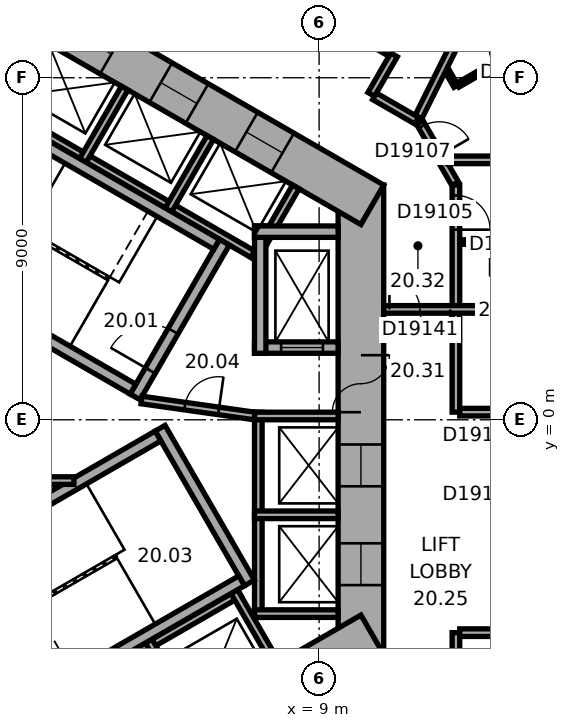
"""IFC4 building model, lengths in metres.
Left out: names, types, materials, properties, quantities, classifications, styles, units other than length and angle.
Written with IfcOpenShell. Run it as: python <this file> out.ifc"""

import sys

from ifc_helpers import new_model, si_unit, direction, frame, frame_2d, origin, place, context, subcontext, project, spatial, rectangle, extrude, element, fill, save


model = new_model("IFC4")
c1 = context("Model", 3, precision=1e-05, world=origin(), true_north=direction((0.0, 1.0)))
c2 = subcontext(c1, "Body", "Model", "MODEL_VIEW")
j1 = project(units=[si_unit("LENGTHUNIT", "METRE"), si_unit("PLANEANGLEUNIT", "RADIAN")], contexts=[c1])
p1 = place(None, origin())
s1 = spatial("IfcSite", under=j1, at=p1, CompositionType="ELEMENT")
p2 = place(p1, origin())
s2 = spatial("IfcBuilding", under=s1, at=p2, CompositionType="ELEMENT")
p3 = place(p2, frame((0.0, 0.0, 90.2)))
s3 = spatial("IfcBuildingStorey", under=s2, at=p3, CompositionType="ELEMENT", Elevation=90.2)
p4 = place(p3, frame((10.1, -6.177, 0.0), z_axis=(0.0, 0.0, 1.0), x_axis=(0.0, 1.0, 0.0)))
e1 = element("IfcWall", 1, at=p4, inside=s3, PredefinedType="SHEAR", context=c2, shape_type="SweptSolid", body=[
    extrude(rectangle(XDim=12.355, YDim=1.2, at=frame_2d((6.177, 0.0))), origin(), (0.0, 0.0, 1.0), 3.3),
])
p5 = place(p4, frame((6.378, 0.0, 0.0)))
e2 = element("IfcOpeningElement", 2, at=p5, cuts=e1, PredefinedType="OPENING", context=c2, shape_type="SweptSolid", body=[
    extrude(rectangle(XDim=1.5, YDim=2.1, at=frame_2d((0.75, 1.05))), frame((0.0, 0.61, 0.0), z_axis=(0.0, -1.0, 0.0), x_axis=(1.0, 0.0, 0.0)), (0.0, 0.0, 1.0), 1.22),
])
p6 = place(p4, frame((1.828, 0.0, 0.0)))
e3 = element("IfcOpeningElement", 3, at=p6, cuts=e1, PredefinedType="OPENING", context=c2, shape_type="SweptSolid", body=[
    extrude(rectangle(XDim=1.1, YDim=2.1, at=frame_2d((0.55, 1.05))), frame((0.0, 0.61, 0.0), z_axis=(0.0, -1.0, 0.0), x_axis=(1.0, 0.0, 0.0)), (0.0, 0.0, 1.0), 1.22),
])
p7 = place(p4, frame((4.427, 0.0, 0.0)))
e4 = element("IfcOpeningElement", 4, at=p7, cuts=e1, PredefinedType="OPENING", context=c2, shape_type="SweptSolid", body=[
    extrude(rectangle(XDim=1.1, YDim=2.1, at=frame_2d((0.55, 1.05))), frame((0.0, 0.61, 0.0), z_axis=(0.0, -1.0, 0.0), x_axis=(1.0, 0.0, 0.0)), (0.0, 0.0, 1.0), 1.22),
])
p8 = place(p3, frame((10.4, 5.658, 0.0), z_axis=(0.0, 0.0, 1.0), x_axis=(-0.866021384402, 0.500006961711, 0.0)))
e5 = element("IfcWall", 5, at=p8, inside=s3, PredefinedType="SHEAR", context=c2, shape_type="SweptSolid", body=[
    extrude(rectangle(XDim=12.355, YDim=1.2, at=frame_2d((6.178, 0.0))), origin(), (0.0, 0.0, 1.0), 3.3),
])
p9 = place(p8, frame((2.728, 0.0, 0.0)))
e6 = element("IfcOpeningElement", 6, at=p9, cuts=e5, PredefinedType="OPENING", context=c2, shape_type="SweptSolid", body=[
    extrude(rectangle(XDim=1.1, YDim=2.1, at=frame_2d((0.55, 1.05))), frame((0.0, 0.61, 0.0), z_axis=(0.0, -1.0, 0.0), x_axis=(1.0, 0.0, 0.0)), (0.0, 0.0, 1.0), 1.22),
])
p10 = place(p8, frame((5.328, 0.0, 0.0)))
e7 = element("IfcOpeningElement", 7, at=p10, cuts=e5, PredefinedType="OPENING", context=c2, shape_type="SweptSolid", body=[
    extrude(rectangle(XDim=1.1, YDim=2.1, at=frame_2d((0.55, 1.05))), frame((0.0, 0.61, 0.0), z_axis=(0.0, -1.0, 0.0), x_axis=(1.0, 0.0, 0.0)), (0.0, 0.0, 1.0), 1.22),
])
p11 = place(p8, frame((7.928, 0.0, 0.0)))
e8 = element("IfcOpeningElement", 8, at=p11, cuts=e5, PredefinedType="OPENING", context=c2, shape_type="SweptSolid", body=[
    extrude(rectangle(XDim=1.1, YDim=2.1, at=frame_2d((0.55, 1.05))), frame((0.0, 0.61, 0.0), z_axis=(0.0, -1.0, 0.0), x_axis=(1.0, 0.0, 0.0)), (0.0, 0.0, 1.0), 1.22),
])
p12 = place(p3, frame((-0.3, -11.836, 0.0), z_axis=(0.0, 0.0, 1.0), x_axis=(0.866021384402, 0.500006961711, 0.0)))
e9 = element("IfcWall", 9, at=p12, inside=s3, PredefinedType="SHEAR", context=c2, shape_type="SweptSolid", body=[
    extrude(rectangle(XDim=12.355, YDim=1.2, at=frame_2d((6.178, 0.0))), origin(), (0.0, 0.0, 1.0), 3.3),
])
p13 = place(p12, frame((4.128, 0.0, 0.0)))
e10 = element("IfcOpeningElement", 10, at=p13, cuts=e9, PredefinedType="OPENING", context=c2, shape_type="SweptSolid", body=[
    extrude(rectangle(XDim=0.9, YDim=2.1, at=frame_2d((0.45, 1.05))), frame((0.0, 0.61, 0.0), z_axis=(0.0, -1.0, 0.0), x_axis=(1.0, 0.0, 0.0)), (0.0, 0.0, 1.0), 1.22),
])
p14 = place(p12, frame((7.928, 0.0, 0.0)))
e11 = element("IfcOpeningElement", 11, at=p14, cuts=e9, PredefinedType="OPENING", context=c2, shape_type="SweptSolid", body=[
    extrude(rectangle(XDim=1.1, YDim=2.1, at=frame_2d((0.55, 1.05))), frame((0.0, 0.61, 0.0), z_axis=(0.0, -1.0, 0.0), x_axis=(1.0, 0.0, 0.0)), (0.0, 0.0, 1.0), 1.22),
])
p15 = place(p3, frame((7.4, -5.2, 0.0), z_axis=(0.0, 0.0, 1.0), x_axis=(0.0, 1.0, 0.0)))
e12 = element("IfcWall", 12, at=p15, inside=s3, PredefinedType="PARTITIONING", context=c2, shape_type="SweptSolid", body=[
    extrude(rectangle(XDim=5.4, YDim=0.2, at=frame_2d((2.7, 0.0))), origin(), (0.0, 0.0, 1.0), 3.05),
])
for number, where, z_axis, x_axis in (
    (13, (7.3, -5.1, 0.0), (0.0, 0.0, 1.0), (1.0, 0.0, 0.0)),
    (14, (7.3, -2.5, 0.0), (0.0, 0.0, 1.0), (1.0, 0.0, 0.0)),
    (15, (7.3, 0.1, 0.0), (0.0, 0.0, 1.0), (1.0, 0.0, 0.0)),
):
    element("IfcWall", number, at=place(p3, frame(where, z_axis=z_axis, x_axis=x_axis)), inside=s3, PredefinedType="PARTITIONING", context=c2, shape_type="SweptSolid", body=[
        extrude(rectangle(XDim=2.2, YDim=0.2, at=frame_2d((1.1, 0.0))), origin(), (0.0, 0.0, 1.0), 3.05),
    ])
p16 = place(p3, frame((7.424, 4.259, 0.0), z_axis=(0.0, 0.0, 1.0), x_axis=(-0.866026010844, 0.49999894854, 0.0)))
e16 = element("IfcWall", 16, at=p16, inside=s3, PredefinedType="PARTITIONING", context=c2, shape_type="SweptSolid", body=[
    extrude(rectangle(XDim=8.0, YDim=0.2, at=frame_2d((4.0, 0.0))), origin(), (0.0, 0.0, 1.0), 3.05),
])
for number, where, z_axis, x_axis in (
    (17, (7.287, 4.222, 0.0), (0.0, 0.0, 1.0), (0.5, 0.866, 0.0)),
    (18, (5.036, 5.522, 0.0), (0.0, 0.0, 1.0), (0.5, 0.866, 0.0)),
    (19, (2.784, 6.822, 0.0), (0.0, 0.0, 1.0), (0.5, 0.866, 0.0)),
):
    element("IfcWall", number, at=place(p3, frame(where, z_axis=z_axis, x_axis=x_axis)), inside=s3, PredefinedType="PARTITIONING", context=c2, shape_type="SweptSolid", body=[
        extrude(rectangle(XDim=2.2, YDim=0.2, at=frame_2d((1.1, 0.0))), origin(), (0.0, 0.0, 1.0), 3.05),
    ])
p17 = place(p3, frame((-0.024, -8.559, 0.0), z_axis=(0.0, 0.0, 1.0), x_axis=(0.866026010844, 0.49999894854, 0.0)))
e20 = element("IfcWall", 20, at=p17, inside=s3, PredefinedType="PARTITIONING", context=c2, shape_type="SweptSolid", body=[
    extrude(rectangle(XDim=8.0, YDim=0.2, at=frame_2d((4.0, 0.0))), origin(), (0.0, 0.0, 1.0), 3.05),
])
for number, where, z_axis, x_axis in (
    (21, (4.516, -5.822, 0.0), (0.0, 0.0, 1.0), (0.5, -0.866, 0.0)),
    (22, (6.768, -4.522, 0.0), (0.0, 0.0, 1.0), (0.5, -0.866, 0.0)),
):
    element("IfcWall", number, at=place(p3, frame(where, z_axis=z_axis, x_axis=x_axis)), inside=s3, PredefinedType="PARTITIONING", context=c2, shape_type="SweptSolid", body=[
        extrude(rectangle(XDim=2.2, YDim=0.2, at=frame_2d((1.1, 0.0))), origin(), (0.0, 0.0, 1.0), 3.05),
    ])
p18 = place(p3, frame((4.158, 0.602, 0.0), z_axis=(0.0, 0.0, 1.0), x_axis=(0.499977259774, 0.866038532462, 0.0)))
e23 = element("IfcWall", 23, at=p18, inside=s3, PredefinedType="SHEAR", context=c2, shape_type="SweptSolid", body=[
    extrude(rectangle(XDim=4.7, YDim=0.3, at=frame_2d((2.35, 0.0))), origin(), (0.0, 0.0, 1.0), 3.05),
])
p19 = place(p18, frame((0.8, 0.0, 0.0)))
e24 = element("IfcOpeningElement", 24, at=p19, cuts=e23, PredefinedType="OPENING", context=c2, shape_type="SweptSolid", body=[
    extrude(rectangle(XDim=1.2, YDim=2.1, at=frame_2d((0.6, 1.05))), frame((0.0, 0.16, 0.0), z_axis=(0.0, -1.0, 0.0), x_axis=(1.0, 0.0, 0.0)), (0.0, 0.0, 1.0), 0.32),
])
for number, where, z_axis, x_axis in (
    (25, (4.103, 0.807, 0.0), (0.0, 0.0, 1.0), (-0.866, 0.5, 0.0)),
    (26, (6.303, 4.617, 0.0), (0.0, 0.0, 1.0), (-0.866, 0.5, 0.0)),
):
    element("IfcWall", number, at=place(p3, frame(where, z_axis=z_axis, x_axis=x_axis)), inside=s3, PredefinedType="SHEAR", context=c2, shape_type="SweptSolid", body=[
        extrude(rectangle(XDim=7.06, YDim=0.3, at=frame_2d((3.53, 0.0))), origin(), (0.0, 0.0, 1.0), 3.05),
    ])
p20 = place(p3, frame((4.816, -0.222, 0.0), z_axis=(0.0, 0.0, 1.0), x_axis=(0.499977259774, -0.866038532462, 0.0)))
e27 = element("IfcWall", 27, at=p20, inside=s3, PredefinedType="SHEAR", context=c2, shape_type="SweptSolid", body=[
    extrude(rectangle(XDim=4.7, YDim=0.3, at=frame_2d((2.35, 0.0))), origin(), (0.0, 0.0, 1.0), 3.05),
])
for number, where, z_axis, x_axis in (
    (28, (-1.353, -3.957, 0.0), (0.0, 0.0, 1.0), (0.866, 0.5, 0.0)),
    (29, (0.847, -7.767, 0.0), (0.0, 0.0, 1.0), (0.866, 0.5, 0.0)),
):
    element("IfcWall", number, at=place(p3, frame(where, z_axis=z_axis, x_axis=x_axis)), inside=s3, PredefinedType="SHEAR", context=c2, shape_type="SweptSolid", body=[
        extrude(rectangle(XDim=7.06, YDim=0.3, at=frame_2d((3.53, 0.0))), origin(), (0.0, 0.0, 1.0), 3.05),
    ])
p21 = place(p3, frame((7.3, 1.9, 0.0), z_axis=(0.0, 0.0, 1.0), x_axis=(1.0, 0.0, 0.0)))
e30 = element("IfcWall", 30, at=p21, inside=s3, PredefinedType="SHEAR", context=c2, shape_type="SweptSolid", body=[
    extrude(rectangle(XDim=2.2, YDim=0.3, at=frame_2d((1.1, 0.0))), origin(), (0.0, 0.0, 1.0), 3.05),
])
p22 = place(p21, frame((0.7, 0.0, 0.0)))
e31 = element("IfcOpeningElement", 31, at=p22, cuts=e30, PredefinedType="OPENING", context=c2, shape_type="SweptSolid", body=[
    extrude(rectangle(XDim=1.1, YDim=2.1, at=frame_2d((0.55, 1.05))), frame((0.0, 0.16, 0.0), z_axis=(0.0, -1.0, 0.0), x_axis=(1.0, 0.0, 0.0)), (0.0, 0.0, 1.0), 0.32),
])
p23 = place(p3, frame((7.45, 1.75, 0.0), z_axis=(0.0, 0.0, 1.0), x_axis=(0.0, 1.0, 0.0)))
e32 = element("IfcWall", 32, at=p23, inside=s3, PredefinedType="SHEAR", context=c2, shape_type="SweptSolid", body=[
    extrude(rectangle(XDim=3.35, YDim=0.3, at=frame_2d((1.675, 0.0))), origin(), (0.0, 0.0, 1.0), 3.05),
])
p24 = place(p3, frame((7.3, 4.95, 0.0), z_axis=(0.0, 0.0, 1.0), x_axis=(1.0, 0.0, 0.0)))
e33 = element("IfcWall", 33, at=p24, inside=s3, PredefinedType="SHEAR", context=c2, shape_type="SweptSolid", body=[
    extrude(rectangle(XDim=2.2, YDim=0.3, at=frame_2d((1.1, 0.0))), origin(), (0.0, 0.0, 1.0), 3.05),
])
p25 = place(p3, frame((4.327, 0.521, 0.0), z_axis=(0.0, 0.0, 1.0), x_axis=(0.990124376366, -0.14019172346, 0.0)))
e34 = element("IfcWall", 34, at=p25, inside=s3, PredefinedType="PARTITIONING", context=c2, shape_type="SweptSolid", body=[
    extrude(rectangle(XDim=3.002, YDim=0.2, at=frame_2d((1.501, 0.0))), origin(), (0.0, 0.0, 1.0), 3.05),
])
p26 = place(p25, frame((1.15, 0.0, 0.0)))
e35 = element("IfcOpeningElement", 35, at=p26, cuts=e34, PredefinedType="OPENING", context=c2, shape_type="SweptSolid", body=[
    extrude(rectangle(XDim=0.9, YDim=2.1, at=frame_2d((0.45, 1.05))), frame((0.0, 0.11, 0.0), z_axis=(0.0, -1.0, 0.0), x_axis=(1.0, 0.0, 0.0)), (0.0, 0.0, 1.0), 0.22),
])
p27 = place(p3, frame((-2.72, -1.6, 0.0), z_axis=(0.0, 0.0, 1.0), x_axis=(1.0, 0.0, 0.0)))
e36 = element("IfcWall", 36, at=p27, inside=s3, PredefinedType="PARTITIONING", context=c2, shape_type="SweptSolid", body=[
    extrude(rectangle(XDim=5.269, YDim=0.2, at=frame_2d((2.634, 0.0))), origin(), (0.0, 0.0, 1.0), 3.05),
])
p28 = place(p3, frame((10.371, 8.561, 0.0), z_axis=(0.0, 0.0, 1.0), x_axis=(0.499986357472, 0.866033280158, 0.0)))
e37 = element("IfcWall", 37, at=p28, inside=s3, PredefinedType="PARTITIONING", context=c2, shape_type="SweptSolid", body=[
    extrude(rectangle(XDim=1.201, YDim=0.2, at=frame_2d((0.601, 0.0))), origin(), (0.0, 0.0, 1.0), 3.05),
])
p29 = place(p3, frame((10.885, 9.652, 0.0), z_axis=(0.0, 0.0, 1.0), x_axis=(-0.866033868542, 0.499985338323, 0.0)))
e38 = element("IfcWall", 38, at=p29, inside=s3, PredefinedType="PARTITIONING", context=c2, shape_type="SweptSolid", body=[
    extrude(rectangle(XDim=8.602, YDim=0.2, at=frame_2d((4.301, 0.0))), origin(), (0.0, 0.0, 1.0), 3.05),
])
p30 = place(p29, frame((2.739, 0.0, 0.0)))
e39 = element("IfcOpeningElement", 39, at=p30, cuts=e38, PredefinedType="OPENING", context=c2, shape_type="SweptSolid", body=[
    extrude(rectangle(XDim=1.0, YDim=2.1, at=frame_2d((0.5, 1.05))), frame((0.0, 0.11, 0.0), z_axis=(0.0, -1.0, 0.0), x_axis=(1.0, 0.0, 0.0)), (0.0, 0.0, 1.0), 0.22),
])
p31 = place(p3, frame((11.566, 7.871, 0.0), z_axis=(0.0, 0.0, 1.0), x_axis=(-0.866004557827, 0.500036104519, 0.0)))
e40 = element("IfcWall", 40, at=p31, inside=s3, PredefinedType="PARTITIONING", context=c2, shape_type="SweptSolid", body=[
    extrude(rectangle(XDim=1.28, YDim=0.2, at=frame_2d((0.64, 0.0))), origin(), (0.0, 0.0, 1.0), 3.05),
])
p32 = place(p3, frame((12.58, 6.212, 0.0), z_axis=(0.0, 0.0, 1.0), x_axis=(-0.500063286585, 0.865988862174, 0.0)))
e41 = element("IfcWall", 41, at=p32, inside=s3, PredefinedType="PARTITIONING", context=c2, shape_type="SweptSolid", body=[
    extrude(rectangle(XDim=1.86, YDim=0.2, at=frame_2d((0.93, 0.0))), origin(), (0.0, 0.0, 1.0), 3.05),
])
p33 = place(p32, frame((0.842, 0.0, 0.0)))
e42 = element("IfcOpeningElement", 42, at=p33, cuts=e41, PredefinedType="OPENING", context=c2, shape_type="SweptSolid", body=[
    extrude(rectangle(XDim=0.9, YDim=2.1, at=frame_2d((0.45, 1.05))), frame((0.0, 0.11, 0.0), z_axis=(0.0, -1.0, 0.0), x_axis=(1.0, 0.0, 0.0)), (0.0, 0.0, 1.0), 0.22),
])
p34 = place(p3, frame((12.6, -6.138, 0.0), z_axis=(0.0, 0.0, 1.0), x_axis=(0.0, 1.0, 0.0)))
e43 = element("IfcWall", 43, at=p34, inside=s3, PredefinedType="PARTITIONING", context=c2, shape_type="SweptSolid", body=[
    extrude(rectangle(XDim=0.537, YDim=0.2, at=frame_2d((0.268, 0.0))), origin(), (0.0, 0.0, 1.0), 3.05),
])
p35 = place(p3, frame((12.6, 0.201, 0.0), z_axis=(0.0, 0.0, 1.0), x_axis=(0.0, 1.0, 0.0)))
e44 = element("IfcWall", 44, at=p35, inside=s3, PredefinedType="PARTITIONING", context=c2, shape_type="SweptSolid", body=[
    extrude(rectangle(XDim=2.604, YDim=0.2, at=frame_2d((1.302, 0.0))), origin(), (0.0, 0.0, 1.0), 3.05),
])
p36 = place(p3, frame((12.6, 3.004, 0.0), z_axis=(0.0, 0.0, 1.0), x_axis=(0.0, 1.0, 0.0)))
e45 = element("IfcWall", 45, at=p36, inside=s3, PredefinedType="PARTITIONING", context=c2, shape_type="SweptSolid", body=[
    extrude(rectangle(XDim=3.173, YDim=0.2, at=frame_2d((1.586, 0.0))), origin(), (0.0, 0.0, 1.0), 3.05),
])
p37 = place(p36, frame((1.998, 0.0, 0.0)))
e46 = element("IfcOpeningElement", 46, at=p37, cuts=e45, PredefinedType="OPENING", context=c2, shape_type="SweptSolid", body=[
    extrude(rectangle(XDim=0.9, YDim=2.1, at=frame_2d((0.45, 1.05))), frame((0.0, 0.11, 0.0), z_axis=(0.0, -1.0, 0.0), x_axis=(1.0, 0.0, 0.0)), (0.0, 0.0, 1.0), 0.22),
])
p38 = place(p3, frame((12.601, 8.776, 0.0), z_axis=(0.0, 0.0, 1.0), x_axis=(-0.500166486798, 0.865929261247, 0.0)))
e47 = element("IfcWall", 47, at=p38, inside=s3, PredefinedType="PARTITIONING", context=c2, shape_type="SweptSolid", body=[
    extrude(rectangle(XDim=0.476, YDim=0.12, at=frame_2d((0.238, 0.0))), origin(), (0.0, 0.0, 1.0), 3.05),
])
p39 = place(p3, frame((12.7, -5.601, 0.0), z_axis=(0.0, 0.0, 1.0), x_axis=(1.0, 0.0, 0.0)))
e48 = element("IfcWall", 48, at=p39, inside=s3, PredefinedType="PARTITIONING", context=c2, shape_type="SweptSolid", body=[
    extrude(rectangle(XDim=1.101, YDim=0.2, at=frame_2d((0.551, 0.0))), origin(), (0.0, 0.0, 1.0), 3.05),
])
p40 = place(p3, frame((12.7, 4.677, 0.0), z_axis=(0.0, 0.0, 1.0), x_axis=(1.0, 0.0, 0.0)))
e49 = element("IfcWall", 49, at=p40, inside=s3, PredefinedType="PARTITIONING", context=c2, shape_type="SweptSolid", body=[
    extrude(rectangle(XDim=2.5, YDim=0.12, at=frame_2d((1.25, 0.0))), origin(), (0.0, 0.0, 1.0), 3.05),
])
p41 = place(p40, frame((0.8, 0.0, 0.0)))
e50 = element("IfcOpeningElement", 50, at=p41, cuts=e49, PredefinedType="OPENING", context=c2, shape_type="SweptSolid", body=[
    extrude(rectangle(XDim=0.9, YDim=2.1, at=frame_2d((0.45, 1.05))), frame((0.0, 0.07, 0.0), z_axis=(0.0, -1.0, 0.0), x_axis=(1.0, 0.0, 0.0)), (0.0, 0.0, 1.0), 0.14),
])
p42 = place(p3, frame((13.701, 0.201, 0.0), z_axis=(0.0, 0.0, 1.0), x_axis=(-1.0, 0.0, 0.0)))
e51 = element("IfcWall", 51, at=p42, inside=s3, PredefinedType="PARTITIONING", context=c2, shape_type="SweptSolid", body=[
    extrude(rectangle(XDim=1.001, YDim=0.2, at=frame_2d((0.5, 0.0))), origin(), (0.0, 0.0, 1.0), 3.05),
])
p43 = place(p3, frame((14.974, 10.146, 0.0), z_axis=(0.0, 0.0, 1.0), x_axis=(-0.86599746015, -0.500048396672, 0.0)))
e52 = element("IfcWall", 52, at=p43, inside=s3, PredefinedType="PARTITIONING", context=c2, shape_type="SweptSolid", body=[
    extrude(rectangle(XDim=2.68, YDim=0.12, at=frame_2d((1.34, 0.0))), origin(), (0.0, 0.0, 1.0), 3.05),
])
p44 = place(p43, frame((0.69, 0.0, 0.0)))
e53 = element("IfcOpeningElement", 53, at=p44, cuts=e52, PredefinedType="OPENING", context=c2, shape_type="SweptSolid", body=[
    extrude(rectangle(XDim=0.9, YDim=2.1, at=frame_2d((0.45, 1.05))), frame((0.0, 0.07, 0.0), z_axis=(0.0, -1.0, 0.0), x_axis=(1.0, 0.0, 0.0)), (0.0, 0.0, 1.0), 0.14),
])
p45 = place(p3, frame((15.915, 16.592, 0.0), z_axis=(0.0, 0.0, 1.0), x_axis=(-0.446199736347, -0.894933402709, 0.0)))
e54 = element("IfcWall", 54, at=p45, inside=s3, PredefinedType="PARTITIONING", context=c2, shape_type="SweptSolid", body=[
    extrude(rectangle(XDim=9.635, YDim=0.2, at=frame_2d((4.817, 0.0))), origin(), (0.0, 0.0, 1.0), 3.05),
])
p46 = place(p3, frame((21.95, 2.905, 0.0), z_axis=(0.0, 0.0, 1.0), x_axis=(-1.0, 0.0, 0.0)))
e55 = element("IfcWall", 55, at=p46, inside=s3, PredefinedType="PARTITIONING", context=c2, shape_type="SweptSolid", body=[
    extrude(rectangle(XDim=11.25, YDim=0.2, at=frame_2d((5.625, 0.0))), origin(), (0.0, 0.0, 1.0), 3.05),
])
p47 = place(p46, frame((9.5, 0.0, 0.0)))
e56 = element("IfcOpeningElement", 56, at=p47, cuts=e55, PredefinedType="OPENING", context=c2, shape_type="SweptSolid", body=[
    extrude(rectangle(XDim=1.6, YDim=2.1, at=frame_2d((0.8, 1.05))), frame((0.0, 0.11, 0.0), z_axis=(0.0, -1.0, 0.0), x_axis=(1.0, 0.0, 0.0)), (0.0, 0.0, 1.0), 0.22),
])
p48 = place(p3, frame((21.95, 6.839, 0.0), z_axis=(0.0, 0.0, 1.0), x_axis=(-1.0, 0.0, 0.0)))
e57 = element("IfcWall", 57, at=p48, inside=s3, PredefinedType="PARTITIONING", context=c2, shape_type="SweptSolid", body=[
    extrude(rectangle(XDim=9.572, YDim=0.2, at=frame_2d((4.786, 0.0))), origin(), (0.0, 0.0, 1.0), 3.05),
])
p49 = place(p5, origin())
e58 = element("IfcDoor", 58, at=p49, inside=s3, OperationType="DOUBLE_DOOR_SINGLE_SWING", PredefinedType="DOOR", context=c2, shape_type="SweptSolid", body=[
    extrude(rectangle(XDim=1.5, YDim=2.1, at=frame_2d((0.75, 1.05))), frame((0.0, 0.025, 0.0), z_axis=(0.0, -1.0, 0.0), x_axis=(1.0, 0.0, 0.0)), (0.0, 0.0, 1.0), 0.05),
])
fill(e2, e58)
p50 = place(p19, origin())
e59 = element("IfcDoor", 59, at=p50, inside=s3, OperationType="SINGLE_SWING_RIGHT", PredefinedType="DOOR", context=c2, shape_type="SweptSolid", body=[
    extrude(rectangle(XDim=1.2, YDim=2.1, at=frame_2d((0.6, 1.05))), frame((0.0, 0.025, 0.0), z_axis=(0.0, -1.0, 0.0), x_axis=(1.0, 0.0, 0.0)), (0.0, 0.0, 1.0), 0.05),
])
fill(e24, e59)
p51 = place(p26, origin())
e60 = element("IfcDoor", 60, at=p51, inside=s3, OperationType="SINGLE_SWING_LEFT", PredefinedType="DOOR", context=c2, shape_type="SweptSolid", body=[
    extrude(rectangle(XDim=0.9, YDim=2.1, at=frame_2d((0.45, 1.05))), frame((0.0, 0.025, 0.0), z_axis=(0.0, -1.0, 0.0), x_axis=(1.0, 0.0, 0.0)), (0.0, 0.0, 1.0), 0.05),
])
fill(e35, e60)
p52 = place(p22, origin())
e61 = element("IfcDoor", 61, at=p52, inside=s3, OperationType="DOUBLE_DOOR_SLIDING", PredefinedType="DOOR", context=c2, shape_type="SweptSolid", body=[
    extrude(rectangle(XDim=1.1, YDim=2.1, at=frame_2d((0.55, 1.05))), frame((0.0, 0.025, 0.0), z_axis=(0.0, -1.0, 0.0), x_axis=(1.0, 0.0, 0.0)), (0.0, 0.0, 1.0), 0.05),
])
fill(e31, e61)
p53 = place(p6, origin())
e62 = element("IfcDoor", 62, at=p53, inside=s3, OperationType="DOUBLE_DOOR_SLIDING", PredefinedType="DOOR", context=c2, shape_type="SweptSolid", body=[
    extrude(rectangle(XDim=1.1, YDim=2.1, at=frame_2d((0.55, 1.05))), frame((0.0, 0.025, 0.0), z_axis=(0.0, -1.0, 0.0), x_axis=(1.0, 0.0, 0.0)), (0.0, 0.0, 1.0), 0.05),
])
fill(e3, e62)
p54 = place(p7, origin())
e63 = element("IfcDoor", 63, at=p54, inside=s3, OperationType="DOUBLE_DOOR_SLIDING", PredefinedType="DOOR", context=c2, shape_type="SweptSolid", body=[
    extrude(rectangle(XDim=1.1, YDim=2.1, at=frame_2d((0.55, 1.05))), frame((0.0, 0.025, 0.0), z_axis=(0.0, -1.0, 0.0), x_axis=(1.0, 0.0, 0.0)), (0.0, 0.0, 1.0), 0.05),
])
fill(e4, e63)
p55 = place(p9, origin())
e64 = element("IfcDoor", 64, at=p55, inside=s3, OperationType="DOUBLE_DOOR_SLIDING", PredefinedType="DOOR", context=c2, shape_type="SweptSolid", body=[
    extrude(rectangle(XDim=1.1, YDim=2.1, at=frame_2d((0.55, 1.05))), frame((0.0, 0.025, 0.0), z_axis=(0.0, -1.0, 0.0), x_axis=(1.0, 0.0, 0.0)), (0.0, 0.0, 1.0), 0.05),
])
fill(e6, e64)
p56 = place(p10, origin())
e65 = element("IfcDoor", 65, at=p56, inside=s3, OperationType="DOUBLE_DOOR_SLIDING", PredefinedType="DOOR", context=c2, shape_type="SweptSolid", body=[
    extrude(rectangle(XDim=1.1, YDim=2.1, at=frame_2d((0.55, 1.05))), frame((0.0, 0.025, 0.0), z_axis=(0.0, -1.0, 0.0), x_axis=(1.0, 0.0, 0.0)), (0.0, 0.0, 1.0), 0.05),
])
fill(e7, e65)
p57 = place(p11, origin())
e66 = element("IfcDoor", 66, at=p57, inside=s3, OperationType="DOUBLE_DOOR_SLIDING", PredefinedType="DOOR", context=c2, shape_type="SweptSolid", body=[
    extrude(rectangle(XDim=1.1, YDim=2.1, at=frame_2d((0.55, 1.05))), frame((0.0, 0.025, 0.0), z_axis=(0.0, -1.0, 0.0), x_axis=(1.0, 0.0, 0.0)), (0.0, 0.0, 1.0), 0.05),
])
fill(e8, e66)
p58 = place(p37, origin())
e67 = element("IfcDoor", 67, at=p58, inside=s3, OperationType="SINGLE_SWING_LEFT", PredefinedType="DOOR", context=c2, shape_type="SweptSolid", body=[
    extrude(rectangle(XDim=0.9, YDim=2.1, at=frame_2d((0.45, 1.05))), frame((0.0, 0.025, 0.0), z_axis=(0.0, -1.0, 0.0), x_axis=(1.0, 0.0, 0.0)), (0.0, 0.0, 1.0), 0.05),
])
fill(e46, e67)
p59 = place(p33, origin())
e68 = element("IfcDoor", 68, at=p59, inside=s3, OperationType="SINGLE_SWING_LEFT", PredefinedType="DOOR", context=c2, shape_type="SweptSolid", body=[
    extrude(rectangle(XDim=0.9, YDim=2.1, at=frame_2d((0.45, 1.05))), frame((0.0, 0.025, 0.0), z_axis=(0.0, -1.0, 0.0), x_axis=(1.0, 0.0, 0.0)), (0.0, 0.0, 1.0), 0.05),
])
fill(e42, e68)
p60 = place(p47, origin())
e69 = element("IfcDoor", 69, at=p60, inside=s3, OperationType="DOUBLE_DOOR_SINGLE_SWING", PredefinedType="DOOR", context=c2, shape_type="SweptSolid", body=[
    extrude(rectangle(XDim=1.6, YDim=2.1, at=frame_2d((0.8, 1.05))), frame((0.0, 0.025, 0.0), z_axis=(0.0, -1.0, 0.0), x_axis=(1.0, 0.0, 0.0)), (0.0, 0.0, 1.0), 0.05),
])
fill(e56, e69)
save(model, sys.argv[1])
